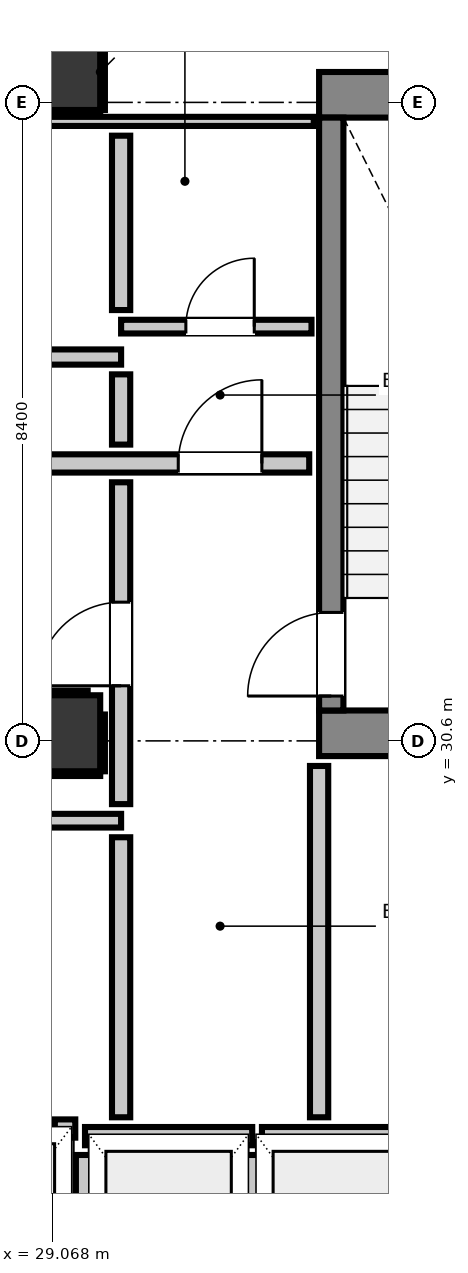
"""IFC4 building model, lengths in metres.
Left out: names, types, materials, properties, quantities, classifications, styles, units other than length and angle.
Written with IfcOpenShell. Run it as: python <this file> out.ifc"""

import sys

from ifc_helpers import new_model, si_unit, direction, frame, frame_2d, origin, origin_2d, place, context, subcontext, project, spatial, rectangle, extrude, element, fill, save


model = new_model("IFC4")
c1 = context("Model", 3, precision=1e-05, world=origin(), true_north=direction((0.0, 1.0)))
c2 = subcontext(c1, "Body", "Model", "MODEL_VIEW")
j1 = project(units=[si_unit("LENGTHUNIT", "METRE"), si_unit("PLANEANGLEUNIT", "RADIAN")], contexts=[c1])
p1 = place(None, origin())
s1 = spatial("IfcSite", under=j1, at=p1, CompositionType="ELEMENT")
p2 = place(p1, origin())
s2 = spatial("IfcBuilding", under=s1, at=p2, CompositionType="ELEMENT")
p3 = place(p2, frame((0.0, 0.0, 96.12)))
s3 = spatial("IfcBuildingStorey", under=s2, at=p3, CompositionType="ELEMENT", Elevation=96.12)
p4 = place(p3, frame((29.2, 39.4, 0.0), z_axis=(0.0, 0.0, 1.0), x_axis=(1.0, 0.0, 0.0)))
e1 = element("IfcColumn", 1, at=p4, inside=s3, PredefinedType="COLUMN", context=c2, shape_type="SweptSolid", body=[
    extrude(rectangle(XDim=1.0, YDim=1.0, at=origin_2d()), origin(), (0.0, 0.0, 1.0), 3.32),
])
p5 = place(p3, frame((32.58, 39.1, 0.0), z_axis=(0.0, 0.0, 1.0), x_axis=(1.0, 0.0, 0.0)))
e2 = element("IfcWall", 2, at=p5, inside=s3, PredefinedType="SHEAR", context=c2, shape_type="SweptSolid", body=[
    extrude(rectangle(XDim=4.08, YDim=0.6, at=frame_2d((2.04, 0.0))), origin(), (0.0, 0.0, 1.0), 3.32),
])
p6 = place(p3, frame((32.58, 30.7, 0.0), z_axis=(0.0, 0.0, 1.0), x_axis=(1.0, 0.0, 0.0)))
e3 = element("IfcWall", 3, at=p6, inside=s3, PredefinedType="SHEAR", context=c2, shape_type="SweptSolid", body=[
    extrude(rectangle(XDim=3.415, YDim=0.6, at=frame_2d((1.708, 0.0))), origin(), (0.0, 0.0, 1.0), 3.32),
])
p7 = place(p3, frame((32.74, 31.0, 0.0), z_axis=(0.0, 0.0, 1.0), x_axis=(0.0, 1.0, 0.0)))
e4 = element("IfcWall", 4, at=p7, inside=s3, PredefinedType="SHEAR", context=c2, shape_type="SweptSolid", body=[
    extrude(rectangle(XDim=7.8, YDim=0.32, at=frame_2d((3.9, 0.0))), origin(), (0.0, 0.0, 1.0), 3.32),
])
p8 = place(p7, frame((0.19, 0.0, 0.0)))
e5 = element("IfcOpeningElement", 5, at=p8, cuts=e4, PredefinedType="OPENING", context=c2, shape_type="SweptSolid", body=[
    extrude(rectangle(XDim=1.1, YDim=2.15, at=frame_2d((0.55, 1.075))), frame((0.0, 0.17, 0.0), z_axis=(0.0, -1.0, 0.0), x_axis=(1.0, 0.0, 0.0)), (0.0, 0.0, 1.0), 0.34),
])
p9 = place(p3, frame((29.2, 30.7, 0.0), z_axis=(0.0, 0.0, 1.0), x_axis=(1.0, 0.0, 0.0)))
e6 = element("IfcColumn", 6, at=p9, inside=s3, PredefinedType="COLUMN", context=c2, shape_type="SweptSolid", body=[
    extrude(rectangle(XDim=1.0, YDim=1.0, at=origin_2d()), origin(), (0.0, 0.0, 1.0), 3.32),
])
p10 = place(p3, frame((29.5, 25.4, 0.0), z_axis=(0.0, 0.0, 1.0), x_axis=(1.0, 0.0, 0.0)))
e7 = element("IfcWall", 7, at=p10, inside=s3, PredefinedType="PARTITIONING", context=c2, shape_type="SweptSolid", body=[
    extrude(rectangle(XDim=2.2, YDim=0.24, at=frame_2d((1.1, 0.0))), origin(), (0.0, 0.0, 1.0), 3.06),
])
p11 = place(p3, frame((29.5, 22.632, 0.0), z_axis=(0.0, 0.0, 1.0), x_axis=(0.0, 1.0, 0.0)))
e8 = element("IfcWall", 8, at=p11, inside=s3, PredefinedType="PARTITIONING", context=c2, shape_type="SweptSolid", body=[
    extrude(rectangle(XDim=2.52, YDim=0.24, at=frame_2d((1.26, 0.0))), origin(), (0.0, 0.0, 1.0), 2.295),
])
p12 = place(p3, frame((31.7, 22.63, 0.0), z_axis=(0.0, 0.0, 1.0), x_axis=(0.0, 1.0, 0.0)))
e9 = element("IfcWall", 9, at=p12, inside=s3, PredefinedType="PARTITIONING", context=c2, shape_type="SweptSolid", body=[
    extrude(rectangle(XDim=2.522, YDim=0.24, at=frame_2d((1.261, 0.0))), origin(), (0.0, 0.0, 1.0), 3.06),
])
p13 = place(p3, frame((31.828, 25.4, 0.0), z_axis=(0.0, 0.0, 1.0), x_axis=(1.0, 0.0, 0.0)))
e10 = element("IfcWall", 10, at=p13, inside=s3, PredefinedType="PARTITIONING", context=c2, shape_type="SweptSolid", body=[
    extrude(rectangle(XDim=2.072, YDim=0.24, at=frame_2d((1.036, 0.0))), origin(), (0.0, 0.0, 1.0), 3.06),
])
p14 = place(p3, frame((29.103, 25.5, 0.0), z_axis=(0.0, 0.0, 1.0), x_axis=(1.0, 0.0, 0.0)))
e11 = element("IfcWall", 11, at=p14, inside=s3, PredefinedType="PARTITIONING", context=c2, shape_type="SweptSolid", body=[
    extrude(rectangle(XDim=0.269, YDim=0.24, at=frame_2d((0.135, 0.0))), origin(), (0.0, 0.0, 1.0), 3.06),
])
p15 = place(p3, frame((28.702, 34.25, 0.0), z_axis=(0.0, 0.0, 1.0), x_axis=(1.0, 0.0, 0.0)))
e12 = element("IfcWall", 12, at=p15, inside=s3, PredefinedType="PARTITIONING", context=c2, shape_type="SweptSolid", body=[
    extrude(rectangle(XDim=3.748, YDim=0.24, at=frame_2d((1.874, 0.0))), origin(), (0.0, 0.0, 1.0), 3.06),
])
p16 = place(p15, frame((2.025, 0.0, 0.0)))
e13 = element("IfcOpeningElement", 13, at=p16, cuts=e12, PredefinedType="OPENING", context=c2, shape_type="SweptSolid", body=[
    extrude(rectangle(XDim=1.1, YDim=2.15, at=frame_2d((0.55, 1.075))), frame((0.0, 0.13, 0.0), z_axis=(0.0, -1.0, 0.0), x_axis=(1.0, 0.0, 0.0)), (0.0, 0.0, 1.0), 0.26),
])
p17 = place(p3, frame((18.95, 35.65, 0.0), z_axis=(0.0, 0.0, 1.0), x_axis=(1.0, 0.0, 0.0)))
e14 = element("IfcWall", 14, at=p17, inside=s3, PredefinedType="PARTITIONING", context=c2, shape_type="SweptSolid", body=[
    extrude(rectangle(XDim=11.025, YDim=0.2, at=frame_2d((5.513, 0.0))), origin(), (0.0, 0.0, 1.0), 3.06),
])
p18 = place(p3, frame((20.65, 29.55, 0.0), z_axis=(0.0, 0.0, 1.0), x_axis=(1.0, 0.0, 0.0)))
e15 = element("IfcWall", 15, at=p18, inside=s3, PredefinedType="PARTITIONING", context=c2, shape_type="SweptSolid", body=[
    extrude(rectangle(XDim=9.325, YDim=0.18, at=frame_2d((4.663, 0.0))), origin(), (0.0, 0.0, 1.0), 3.06),
])
p19 = place(p3, frame((29.975, 36.05, 0.0), z_axis=(0.0, 0.0, 1.0), x_axis=(1.0, 0.0, 0.0)))
e16 = element("IfcWall", 16, at=p19, inside=s3, PredefinedType="PARTITIONING", context=c2, shape_type="SweptSolid", body=[
    extrude(rectangle(XDim=2.505, YDim=0.18, at=frame_2d((1.252, 0.0))), origin(), (0.0, 0.0, 1.0), 3.06),
])
p20 = place(p19, frame((0.852, 0.0, 0.0)))
e17 = element("IfcOpeningElement", 17, at=p20, cuts=e16, PredefinedType="OPENING", context=c2, shape_type="SweptSolid", body=[
    extrude(rectangle(XDim=0.9, YDim=2.1, at=frame_2d((0.45, 1.05))), frame((0.0, 0.1, 0.0), z_axis=(0.0, -1.0, 0.0), x_axis=(1.0, 0.0, 0.0)), (0.0, 0.0, 1.0), 0.2),
])
p21 = place(p3, frame((18.95, 38.75, 0.0), z_axis=(0.0, 0.0, 1.0), x_axis=(1.0, 0.0, 0.0)))
e18 = element("IfcWall", 18, at=p21, inside=s3, PredefinedType="PARTITIONING", context=c2, shape_type="SweptSolid", body=[
    extrude(rectangle(XDim=13.56, YDim=0.12, at=frame_2d((6.78, 0.0))), origin(), (0.0, 0.0, 1.0), 3.06),
])
p22 = place(p3, frame((29.975, 25.648, 0.0), z_axis=(0.0, 0.0, 1.0), x_axis=(0.0, 1.0, 0.0)))
e19 = element("IfcWall", 19, at=p22, inside=s3, PredefinedType="PARTITIONING", context=c2, shape_type="SweptSolid", body=[
    extrude(rectangle(XDim=3.684, YDim=0.24, at=frame_2d((1.842, 0.0))), origin(), (0.0, 0.0, 1.0), 3.06),
])
p23 = place(p3, frame((29.975, 29.768, 0.0), z_axis=(0.0, 0.0, 1.0), x_axis=(0.0, 1.0, 0.0)))
e20 = element("IfcWall", 20, at=p23, inside=s3, PredefinedType="PARTITIONING", context=c2, shape_type="SweptSolid", body=[
    extrude(rectangle(XDim=4.234, YDim=0.24, at=frame_2d((2.117, 0.0))), origin(), (0.0, 0.0, 1.0), 3.06),
])
p24 = place(p23, frame((1.557, 0.0, 0.0)))
e21 = element("IfcOpeningElement", 21, at=p24, cuts=e20, PredefinedType="OPENING", context=c2, shape_type="SweptSolid", body=[
    extrude(rectangle(XDim=1.1, YDim=2.15, at=frame_2d((0.55, 1.075))), frame((0.0, 0.13, 0.0), z_axis=(0.0, -1.0, 0.0), x_axis=(1.0, 0.0, 0.0)), (0.0, 0.0, 1.0), 0.26),
])
p25 = place(p3, frame((29.975, 34.498, 0.0), z_axis=(0.0, 0.0, 1.0), x_axis=(0.0, 1.0, 0.0)))
e22 = element("IfcWall", 22, at=p25, inside=s3, PredefinedType="PARTITIONING", context=c2, shape_type="SweptSolid", body=[
    extrude(rectangle(XDim=0.924, YDim=0.24, at=frame_2d((0.462, 0.0))), origin(), (0.0, 0.0, 1.0), 3.06),
])
p26 = place(p3, frame((29.975, 36.268, 0.0), z_axis=(0.0, 0.0, 1.0), x_axis=(0.0, 1.0, 0.0)))
e23 = element("IfcWall", 23, at=p26, inside=s3, PredefinedType="PARTITIONING", context=c2, shape_type="SweptSolid", body=[
    extrude(rectangle(XDim=2.294, YDim=0.24, at=frame_2d((1.147, 0.0))), origin(), (0.0, 0.0, 1.0), 3.06),
])
p27 = place(p3, frame((32.58, 25.648, 0.0), z_axis=(0.0, 0.0, 1.0), x_axis=(0.0, 1.0, 0.0)))
e24 = element("IfcWall", 24, at=p27, inside=s3, PredefinedType="PARTITIONING", context=c2, shape_type="SweptSolid", body=[
    extrude(rectangle(XDim=4.622, YDim=0.24, at=frame_2d((2.311, 0.0))), origin(), (0.0, 0.0, 1.0), 3.06),
])
for number, where, z_axis, x_axis in (
    (25, (28.7, 38.868, 0.0), (0.0, 0.0, 1.0), (1.0, 0.0, 0.0)),
    (26, (29.732, 38.9, 0.0), (0.0, 0.0, 1.0), (0.0, 1.0, 0.0)),
    (27, (28.7, 30.168, 0.0), (0.0, 0.0, 1.0), (1.0, 0.0, 0.0)),
):
    element("IfcWall", number, at=place(p3, frame(where, z_axis=z_axis, x_axis=x_axis)), inside=s3, PredefinedType="PARTITIONING", context=c2, shape_type="SweptSolid", body=[
        extrude(rectangle(XDim=1.0, YDim=0.06, at=frame_2d((0.5, 0.0))), origin(), (0.0, 0.0, 1.0), 1.45),
    ])
p28 = place(p3, frame((28.7, 31.232, 0.0), z_axis=(0.0, 0.0, 1.0), x_axis=(1.0, 0.0, 0.0)))
e28 = element("IfcWall", 28, at=p28, inside=s3, PredefinedType="PARTITIONING", context=c2, shape_type="SweptSolid", body=[
    extrude(rectangle(XDim=0.835, YDim=0.06, at=frame_2d((0.417, 0.0))), origin(), (0.0, 0.0, 1.0), 1.45),
])
p29 = place(p3, frame((29.732, 30.2, 0.0), z_axis=(0.0, 0.0, 1.0), x_axis=(0.0, 1.0, 0.0)))
e29 = element("IfcWall", 29, at=p29, inside=s3, PredefinedType="PARTITIONING", context=c2, shape_type="SweptSolid", body=[
    extrude(rectangle(XDim=0.747, YDim=0.06, at=frame_2d((0.374, 0.0))), origin(), (0.0, 0.0, 1.0), 1.45),
])
p30 = place(p8, origin())
e30 = element("IfcDoor", 30, at=p30, inside=s3, OperationType="SINGLE_SWING_LEFT", PredefinedType="DOOR", context=c2, shape_type="SweptSolid", body=[
    extrude(rectangle(XDim=1.1, YDim=2.15, at=frame_2d((0.55, 1.075))), frame((0.0, 0.025, 0.0), z_axis=(0.0, -1.0, 0.0), x_axis=(1.0, 0.0, 0.0)), (0.0, 0.0, 1.0), 0.05),
])
fill(e5, e30)
p31 = place(p24, origin())
e31 = element("IfcDoor", 31, at=p31, inside=s3, OperationType="SINGLE_SWING_LEFT", PredefinedType="DOOR", context=c2, shape_type="SweptSolid", body=[
    extrude(rectangle(XDim=1.1, YDim=2.15, at=frame_2d((0.55, 1.075))), frame((0.0, 0.025, 0.0), z_axis=(0.0, -1.0, 0.0), x_axis=(1.0, 0.0, 0.0)), (0.0, 0.0, 1.0), 0.05),
])
fill(e21, e31)
p32 = place(p16, origin())
e32 = element("IfcDoor", 32, at=p32, inside=s3, OperationType="SINGLE_SWING_RIGHT", PredefinedType="DOOR", context=c2, shape_type="SweptSolid", body=[
    extrude(rectangle(XDim=1.1, YDim=2.15, at=frame_2d((0.55, 1.075))), frame((0.0, 0.025, 0.0), z_axis=(0.0, -1.0, 0.0), x_axis=(1.0, 0.0, 0.0)), (0.0, 0.0, 1.0), 0.05),
])
fill(e13, e32)
p33 = place(p20, origin())
e33 = element("IfcDoor", 33, at=p33, inside=s3, OperationType="SINGLE_SWING_RIGHT", PredefinedType="DOOR", context=c2, shape_type="SweptSolid", body=[
    extrude(rectangle(XDim=0.9, YDim=2.1, at=frame_2d((0.45, 1.05))), frame((0.0, 0.025, 0.0), z_axis=(0.0, -1.0, 0.0), x_axis=(1.0, 0.0, 0.0)), (0.0, 0.0, 1.0), 0.05),
])
fill(e17, e33)
save(model, sys.argv[1])
